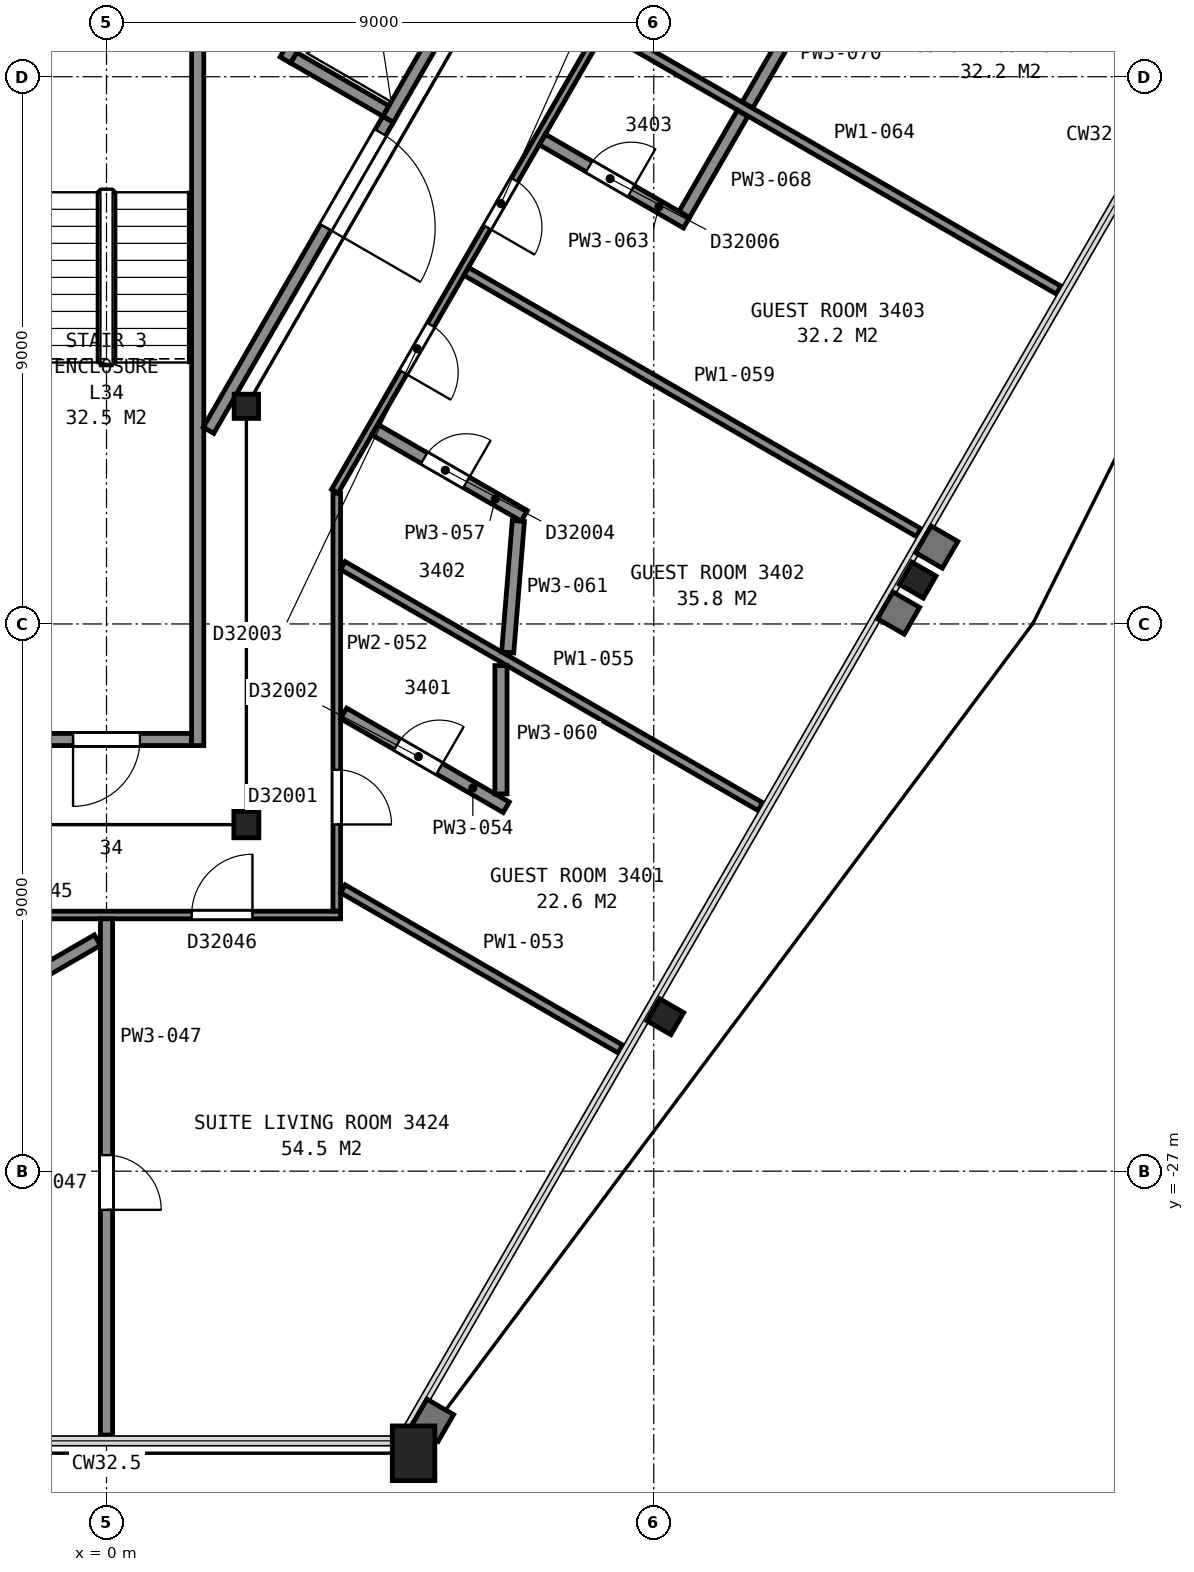
"""IFC4 building model, lengths in metres.
Left out: names, types, materials, properties, quantities, classifications, styles, units other than length and angle.
Written with IfcOpenShell. Run it as: python <this file> out.ifc"""

import sys

from ifc_helpers import new_model, si_unit, direction, frame, frame_2d, origin, origin_2d, place, context, subcontext, project, spatial, rectangle, hollow_rectangle, i_section, extrude, element, fill, save


model = new_model("IFC4")
c1 = context("Model", 3, precision=1e-05, world=origin(), true_north=direction((0.0, 1.0)))
c2 = subcontext(c1, "Body", "Model", "MODEL_VIEW")
j1 = project(units=[si_unit("LENGTHUNIT", "METRE"), si_unit("PLANEANGLEUNIT", "RADIAN")], contexts=[c1])
p1 = place(None, origin())
s1 = spatial("IfcSite", under=j1, at=p1, CompositionType="ELEMENT")
p2 = place(p1, origin())
s2 = spatial("IfcBuilding", under=s1, at=p2, CompositionType="ELEMENT")
p3 = place(p2, frame((0.0, 0.0, 139.6)))
s3 = spatial("IfcBuildingStorey", under=s2, at=p3, CompositionType="ELEMENT", Elevation=139.6)
p4 = place(p3, frame((5.05, -31.64, 0.0), z_axis=(0.0, 0.0, 1.0), x_axis=(-1.0, 0.0, 0.0)))
e1 = element("IfcColumn", 1, at=p4, inside=s3, PredefinedType="COLUMN", context=c2, shape_type="SweptSolid", body=[
    extrude(hollow_rectangle(XDim=0.7, YDim=0.9, WallThickness=0.065, at=origin_2d()), origin(), (0.0, 0.0, 1.0), 3.6),
])
for number, where, z_axis, x_axis in (
    (2, (9.19, -24.46, 0.0), (0.0, 0.0, 1.0), (-0.5, -0.866, 0.0)),
    (3, (13.34, -17.28, 0.0), (0.0, 0.0, 1.0), (-0.5, -0.866, 0.0)),
):
    element("IfcColumn", number, at=place(p3, frame(where, z_axis=z_axis, x_axis=x_axis)), inside=s3, PredefinedType="COLUMN", context=c2, shape_type="SweptSolid", body=[
        extrude(i_section(OverallWidth=0.419, OverallDepth=0.455, WebThickness=0.042, FlangeThickness=0.068, FilletRadius=0.015, at=origin_2d()), origin(), (0.0, 0.0, 1.0), 2.87),
    ])
p5 = place(p3, frame((2.3, -21.3, 0.0), z_axis=(0.0, 0.0, 1.0), x_axis=(-1.0, 0.0, 0.0)))
e4 = element("IfcColumn", 4, at=p5, inside=s3, PredefinedType="COLUMN", context=c2, shape_type="SweptSolid", body=[
    extrude(i_section(OverallWidth=0.411, OverallDepth=0.434, WebThickness=0.036, FlangeThickness=0.057, FilletRadius=0.015, at=origin_2d()), origin(), (0.0, 0.0, 1.0), 3.545),
])
p6 = place(p3, frame((2.3, -14.42, 0.0), z_axis=(0.0, 0.0, 1.0), x_axis=(1.0, 0.0, 0.0)))
e5 = element("IfcColumn", 5, at=p6, inside=s3, PredefinedType="COLUMN", context=c2, shape_type="SweptSolid", body=[
    extrude(i_section(OverallWidth=0.401, OverallDepth=0.399, WebThickness=0.025, FlangeThickness=0.04, FilletRadius=0.015, at=origin_2d()), origin(), (0.0, 0.0, 1.0), 3.55),
])
p7 = place(p3, frame((-1.4, -19.9, 0.0), z_axis=(0.0, 0.0, 1.0), x_axis=(1.0, 0.0, 0.0)))
e6 = element("IfcWall", 6, at=p7, inside=s3, PredefinedType="PARTITIONING", context=c2, shape_type="SweptSolid", body=[
    extrude(rectangle(XDim=2.8, YDim=0.2, at=frame_2d((1.4, 0.0))), origin(), (0.0, 0.0, 1.0), 3.35),
])
p8 = place(p7, frame((0.85, 0.0, 0.0)))
e7 = element("IfcOpeningElement", 7, at=p8, cuts=e6, PredefinedType="OPENING", context=c2, shape_type="SweptSolid", body=[
    extrude(rectangle(XDim=1.1, YDim=2.1, at=frame_2d((0.55, 1.05))), frame((0.0, 0.11, 0.0), z_axis=(0.0, -1.0, 0.0), x_axis=(1.0, 0.0, 0.0)), (0.0, 0.0, 1.0), 0.22),
])
p9 = place(p3, frame((1.5, -8.0, 0.0), z_axis=(0.0, 0.0, 1.0), x_axis=(0.0, -1.0, 0.0)))
e8 = element("IfcWall", 8, at=p9, inside=s3, PredefinedType="PARTITIONING", context=c2, shape_type="SweptSolid", body=[
    extrude(rectangle(XDim=12.0, YDim=0.2, at=frame_2d((6.0, 0.0))), origin(), (0.0, 0.0, 1.0), 3.35),
])
p10 = place(p3, frame((4.63, -9.7, 0.0), z_axis=(0.0, 0.0, 1.0), x_axis=(0.500062241894, 0.865989465428, 0.0)))
e9 = element("IfcWall", 9, at=p10, inside=s3, PredefinedType="PARTITIONING", context=c2, shape_type="SweptSolid", body=[
    extrude(rectangle(XDim=2.55, YDim=0.2, at=frame_2d((1.275, 0.0))), origin(), (0.0, 0.0, 1.0), 3.6),
])
p11 = place(p3, frame((2.942, -8.725, 0.0), z_axis=(0.0, 0.0, 1.0), x_axis=(0.500016218704, 0.866016039709, 0.0)))
e10 = element("IfcWall", 10, at=p11, inside=s3, PredefinedType="PARTITIONING", context=c2, shape_type="SweptSolid", body=[
    extrude(rectangle(XDim=2.35, YDim=0.2, at=frame_2d((1.175, 0.0))), origin(), (0.0, 0.0, 1.0), 3.6),
])
p12 = place(p11, frame((0.725, 0.0, 0.0)))
e11 = element("IfcOpeningElement", 11, at=p12, cuts=e10, PredefinedType="OPENING", context=c2, shape_type="SweptSolid", body=[
    extrude(rectangle(XDim=1.1, YDim=2.1, at=frame_2d((0.55, 1.05))), frame((0.0, 0.11, 0.0), z_axis=(0.0, -1.0, 0.0), x_axis=(1.0, 0.0, 0.0)), (0.0, 0.0, 1.0), 0.22),
])
p13 = place(p3, frame((4.594, -9.563, 0.0), z_axis=(0.0, 0.0, 1.0), x_axis=(-0.866036909293, 0.499980071345, 0.0)))
e12 = element("IfcWall", 12, at=p13, inside=s3, PredefinedType="PARTITIONING", context=c2, shape_type="SweptSolid", body=[
    extrude(rectangle(XDim=1.75, YDim=0.2, at=frame_2d((0.875, 0.0))), origin(), (0.0, 0.0, 1.0), 3.6),
])
p14 = place(p3, frame((1.677, -14.815, 0.0), z_axis=(0.0, 0.0, 1.0), x_axis=(0.49999445743, 0.866028603765, 0.0)))
e13 = element("IfcWall", 13, at=p14, inside=s3, PredefinedType="PARTITIONING", context=c2, shape_type="SweptSolid", body=[
    extrude(rectangle(XDim=5.905, YDim=0.2, at=frame_2d((2.952, 0.0))), origin(), (0.0, 0.0, 1.0), 3.35),
])
p15 = place(p14, frame((3.855, 0.0, 0.0)))
e14 = element("IfcOpeningElement", 14, at=p15, cuts=e13, PredefinedType="OPENING", context=c2, shape_type="SweptSolid", body=[
    extrude(rectangle(XDim=1.8, YDim=2.1, at=frame_2d((0.9, 1.05))), frame((0.0, 0.11, 0.0), z_axis=(0.0, -1.0, 0.0), x_axis=(1.0, 0.0, 0.0)), (0.0, 0.0, 1.0), 0.22),
])
p16 = place(p3, frame((-4.31, -25.602, 0.0), z_axis=(0.0, 0.0, 1.0), x_axis=(0.866045077667, 0.499965922287, 0.0)))
e15 = element("IfcWall", 15, at=p16, inside=s3, PredefinedType="PARTITIONING", context=c2, shape_type="SweptSolid", body=[
    extrude(rectangle(XDim=4.803, YDim=0.2, at=frame_2d((2.401, 0.0))), origin(), (0.0, 0.0, 1.0), 2.262),
])
p17 = place(p3, frame((3.85, -22.787, 0.0), z_axis=(0.0, 0.0, 1.0), x_axis=(-1.0, 0.0, 0.0)))
e16 = element("IfcWall", 16, at=p17, inside=s3, PredefinedType="PARTITIONING", context=c2, shape_type="SweptSolid", body=[
    extrude(rectangle(XDim=7.699, YDim=0.125, at=frame_2d((3.85, 0.0))), origin(), (0.0, 0.0, 1.0), 2.262),
])
p18 = place(p17, frame((1.449, 0.0, 0.0)))
e17 = element("IfcOpeningElement", 17, at=p18, cuts=e16, PredefinedType="OPENING", context=c2, shape_type="SweptSolid", body=[
    extrude(rectangle(XDim=1.0, YDim=2.1, at=frame_2d((0.5, 1.05))), frame((0.0, 0.073, 0.0), z_axis=(0.0, -1.0, 0.0), x_axis=(1.0, 0.0, 0.0)), (0.0, 0.0, 1.0), 0.145),
])
p19 = place(p3, frame((0.0, -31.34, 0.0), z_axis=(0.0, 0.0, 1.0), x_axis=(0.0, 1.0, 0.0)))
e18 = element("IfcWall", 18, at=p19, inside=s3, PredefinedType="PARTITIONING", context=c2, shape_type="SweptSolid", body=[
    extrude(rectangle(XDim=8.49, YDim=0.2, at=frame_2d((4.245, 0.0))), origin(), (0.0, 0.0, 1.0), 2.262),
])
p20 = place(p19, frame((3.704, 0.0, 0.0)))
e19 = element("IfcOpeningElement", 19, at=p20, cuts=e18, PredefinedType="OPENING", context=c2, shape_type="SweptSolid", body=[
    extrude(rectangle(XDim=0.9, YDim=2.1, at=frame_2d((0.45, 1.05))), frame((0.0, 0.11, 0.0), z_axis=(0.0, -1.0, 0.0), x_axis=(1.0, 0.0, 0.0)), (0.0, 0.0, 1.0), 0.22),
])
p21 = place(p3, frame((3.787, -15.847, 0.0), z_axis=(0.0, 0.0, 1.0), x_axis=(0.0, -1.0, 0.0)))
e20 = element("IfcWall", 20, at=p21, inside=s3, PredefinedType="PARTITIONING", context=c2, shape_type="SweptSolid", body=[
    extrude(rectangle(XDim=6.875, YDim=0.125, at=frame_2d((3.438, 0.0))), origin(), (0.0, 0.0, 1.0), 2.262),
])
p22 = place(p21, frame((4.551, 0.0, 0.0)))
e21 = element("IfcOpeningElement", 21, at=p22, cuts=e20, PredefinedType="OPENING", context=c2, shape_type="SweptSolid", body=[
    extrude(rectangle(XDim=0.9, YDim=2.1, at=frame_2d((0.45, 1.05))), frame((0.0, 0.073, 0.0), z_axis=(0.0, -1.0, 0.0), x_axis=(1.0, 0.0, 0.0)), (0.0, 0.0, 1.0), 0.145),
])
p23 = place(p3, frame((3.887, -22.356, 0.0), z_axis=(0.0, 0.0, 1.0), x_axis=(0.866039804031, -0.499975057213, 0.0)))
e22 = element("IfcWall", 22, at=p23, inside=s3, PredefinedType="PARTITIONING", context=c2, shape_type="SweptSolid", body=[
    extrude(rectangle(XDim=5.271, YDim=0.15, at=frame_2d((2.635, 0.0))), origin(), (0.0, 0.0, 1.0), 2.262),
])
p24 = place(p3, frame((3.899, -19.471, 0.0), z_axis=(0.0, 0.0, 1.0), x_axis=(0.866015731669, -0.500016752221, 0.0)))
e23 = element("IfcWall", 23, at=p24, inside=s3, PredefinedType="PARTITIONING", context=c2, shape_type="SweptSolid", body=[
    extrude(rectangle(XDim=3.088, YDim=0.2, at=frame_2d((1.544, 0.0))), origin(), (0.0, 0.0, 1.0), 2.262),
])
p25 = place(p24, frame((1.02, 0.0, 0.0)))
e24 = element("IfcOpeningElement", 24, at=p25, cuts=e23, PredefinedType="OPENING", context=c2, shape_type="SweptSolid", body=[
    extrude(rectangle(XDim=0.8, YDim=2.1, at=frame_2d((0.4, 1.05))), frame((0.0, 0.11, 0.0), z_axis=(0.0, -1.0, 0.0), x_axis=(1.0, 0.0, 0.0)), (0.0, 0.0, 1.0), 0.22),
])
p26 = place(p3, frame((3.887, -17.04, 0.0), z_axis=(0.0, 0.0, 1.0), x_axis=(0.866046118416, -0.499964119488, 0.0)))
e25 = element("IfcWall", 25, at=p26, inside=s3, PredefinedType="PARTITIONING", context=c2, shape_type="SweptSolid", body=[
    extrude(rectangle(XDim=7.929, YDim=0.15, at=frame_2d((3.964, 0.0))), origin(), (0.0, 0.0, 1.0), 2.262),
])
p27 = place(p3, frame((15.962, 5.326, 0.0), z_axis=(0.0, 0.0, 1.0), x_axis=(-0.499992829944, -0.866029543379, 0.0)))
e26 = element("IfcWall", 26, at=p27, inside=s3, PredefinedType="PARTITIONING", context=c2, shape_type="SweptSolid", body=[
    extrude(rectangle(XDim=24.413, YDim=0.125, at=frame_2d((12.207, 0.0))), origin(), (0.0, 0.0, 1.0), 2.262),
])
p28 = place(p27, frame((21.258, 0.0, 0.0)))
e27 = element("IfcOpeningElement", 27, at=p28, cuts=e26, PredefinedType="OPENING", context=c2, shape_type="SweptSolid", body=[
    extrude(rectangle(XDim=0.9, YDim=2.1, at=frame_2d((0.45, 1.05))), frame((0.0, 0.073, 0.0), z_axis=(0.0, -1.0, 0.0), x_axis=(1.0, 0.0, 0.0)), (0.0, 0.0, 1.0), 0.145),
])
p29 = place(p27, frame((18.502, 0.0, 0.0)))
e28 = element("IfcOpeningElement", 28, at=p29, cuts=e26, PredefinedType="OPENING", context=c2, shape_type="SweptSolid", body=[
    extrude(rectangle(XDim=0.9, YDim=2.1, at=frame_2d((0.45, 1.05))), frame((0.0, 0.073, 0.0), z_axis=(0.0, -1.0, 0.0), x_axis=(1.0, 0.0, 0.0)), (0.0, 0.0, 1.0), 0.145),
])
p30 = place(p27, frame((11.799, 0.0, 0.0)))
e29 = element("IfcOpeningElement", 29, at=p30, cuts=e26, PredefinedType="OPENING", context=c2, shape_type="SweptSolid", body=[
    extrude(rectangle(XDim=0.9, YDim=2.1, at=frame_2d((0.45, 1.05))), frame((0.0, 0.073, 0.0), z_axis=(0.0, -1.0, 0.0), x_axis=(1.0, 0.0, 0.0)), (0.0, 0.0, 1.0), 0.145),
])
p31 = place(p27, frame((9.043, 0.0, 0.0)))
e30 = element("IfcOpeningElement", 30, at=p31, cuts=e26, PredefinedType="OPENING", context=c2, shape_type="SweptSolid", body=[
    extrude(rectangle(XDim=0.9, YDim=2.1, at=frame_2d((0.45, 1.05))), frame((0.0, 0.073, 0.0), z_axis=(0.0, -1.0, 0.0), x_axis=(1.0, 0.0, 0.0)), (0.0, 0.0, 1.0), 0.145),
])
p32 = place(p27, frame((1.99, 0.0, 0.0)))
e31 = element("IfcOpeningElement", 31, at=p32, cuts=e26, PredefinedType="OPENING", context=c2, shape_type="SweptSolid", body=[
    extrude(rectangle(XDim=0.9, YDim=2.1, at=frame_2d((0.45, 1.05))), frame((0.0, 0.073, 0.0), z_axis=(0.0, -1.0, 0.0), x_axis=(1.0, 0.0, 0.0)), (0.0, 0.0, 1.0), 0.145),
])
p33 = place(p3, frame((6.871, -16.222, 0.0), z_axis=(0.0, 0.0, 1.0), x_axis=(-0.866048046904, 0.499960778915, 0.0)))
e32 = element("IfcWall", 32, at=p33, inside=s3, PredefinedType="PARTITIONING", context=c2, shape_type="SweptSolid", body=[
    extrude(rectangle(XDim=2.838, YDim=0.2, at=frame_2d((1.419, 0.0))), origin(), (0.0, 0.0, 1.0), 2.262),
])
p34 = place(p33, frame((1.1, 0.0, 0.0)))
e33 = element("IfcOpeningElement", 33, at=p34, cuts=e32, PredefinedType="OPENING", context=c2, shape_type="SweptSolid", body=[
    extrude(rectangle(XDim=0.8, YDim=2.1, at=frame_2d((0.4, 1.05))), frame((0.0, 0.11, 0.0), z_axis=(0.0, -1.0, 0.0), x_axis=(1.0, 0.0, 0.0)), (0.0, 0.0, 1.0), 0.22),
])
p35 = place(p3, frame((5.916, -12.201, 0.0), z_axis=(0.0, 0.0, 1.0), x_axis=(0.865995804368, -0.50005126419, 0.0)))
e34 = element("IfcWall", 34, at=p35, inside=s3, PredefinedType="PARTITIONING", context=c2, shape_type="SweptSolid", body=[
    extrude(rectangle(XDim=8.591, YDim=0.15, at=frame_2d((4.295, 0.0))), origin(), (0.0, 0.0, 1.0), 2.262),
])
p36 = place(p3, frame((6.487, -20.795, 0.0), z_axis=(0.0, 0.0, 1.0), x_axis=(0.0, 1.0, 0.0)))
e35 = element("IfcWall", 35, at=p36, inside=s3, PredefinedType="PARTITIONING", context=c2, shape_type="SweptSolid", body=[
    extrude(rectangle(XDim=2.111, YDim=0.2, at=frame_2d((1.055, 0.0))), origin(), (0.0, 0.0, 1.0), 2.262),
])
p37 = place(p3, frame((6.598, -18.468, 0.0), z_axis=(0.0, 0.0, 1.0), x_axis=(0.080948878916, 0.996718254575, 0.0)))
e36 = element("IfcWall", 36, at=p37, inside=s3, PredefinedType="PARTITIONING", context=c2, shape_type="SweptSolid", body=[
    extrude(rectangle(XDim=2.168, YDim=0.2, at=frame_2d((1.084, 0.0))), origin(), (0.0, 0.0, 1.0), 2.262),
])
p38 = place(p3, frame((7.168, -10.032, 0.0), z_axis=(0.0, 0.0, 1.0), x_axis=(0.86596722502, -0.50010075504, 0.0)))
e37 = element("IfcWall", 37, at=p38, inside=s3, PredefinedType="PARTITIONING", context=c2, shape_type="SweptSolid", body=[
    extrude(rectangle(XDim=2.737, YDim=0.2, at=frame_2d((1.369, 0.0))), origin(), (0.0, 0.0, 1.0), 2.262),
])
p39 = place(p38, frame((0.887, 0.0, 0.0)))
e38 = element("IfcOpeningElement", 38, at=p39, cuts=e37, PredefinedType="OPENING", context=c2, shape_type="SweptSolid", body=[
    extrude(rectangle(XDim=0.8, YDim=2.1, at=frame_2d((0.4, 1.05))), frame((0.0, 0.11, 0.0), z_axis=(0.0, -1.0, 0.0), x_axis=(1.0, 0.0, 0.0)), (0.0, 0.0, 1.0), 0.22),
])
p40 = place(p3, frame((8.218, -8.213, 0.0), z_axis=(0.0, 0.0, 1.0), x_axis=(0.865997709989, -0.500047963993, 0.0)))
e39 = element("IfcWall", 39, at=p40, inside=s3, PredefinedType="PARTITIONING", context=c2, shape_type="SweptSolid", body=[
    extrude(rectangle(XDim=8.592, YDim=0.15, at=frame_2d((4.296, 0.0))), origin(), (0.0, 0.0, 1.0), 2.262),
])
p41 = place(p3, frame((9.502, -11.264, 0.0), z_axis=(0.0, 0.0, 1.0), x_axis=(0.499887618105, 0.86609027778, 0.0)))
e40 = element("IfcWall", 40, at=p41, inside=s3, PredefinedType="PARTITIONING", context=c2, shape_type="SweptSolid", body=[
    extrude(rectangle(XDim=1.919, YDim=0.2, at=frame_2d((0.96, 0.0))), origin(), (0.0, 0.0, 1.0), 2.262),
])
p42 = place(p3, frame((10.542, -9.463, 0.0), z_axis=(0.0, 0.0, 1.0), x_axis=(0.500214044309, 0.865901789971, 0.0)))
e41 = element("IfcWall", 41, at=p42, inside=s3, PredefinedType="PARTITIONING", context=c2, shape_type="SweptSolid", body=[
    extrude(rectangle(XDim=1.92, YDim=0.2, at=frame_2d((0.96, 0.0))), origin(), (0.0, 0.0, 1.0), 2.262),
])
p43 = place(p8, origin())
e42 = element("IfcDoor", 42, at=p43, inside=s3, OperationType="SINGLE_SWING_LEFT", PredefinedType="DOOR", context=c2, shape_type="SweptSolid", body=[
    extrude(rectangle(XDim=1.1, YDim=2.1, at=frame_2d((0.55, 1.05))), frame((0.0, 0.025, 0.0), z_axis=(0.0, -1.0, 0.0), x_axis=(1.0, 0.0, 0.0)), (0.0, 0.0, 1.0), 0.05),
])
fill(e7, e42)
p44 = place(p15, origin())
e43 = element("IfcDoor", 43, at=p44, inside=s3, OperationType="DOUBLE_DOOR_SINGLE_SWING", PredefinedType="DOOR", context=c2, shape_type="SweptSolid", body=[
    extrude(rectangle(XDim=1.8, YDim=2.1, at=frame_2d((0.9, 1.05))), frame((0.0, 0.025, 0.0), z_axis=(0.0, -1.0, 0.0), x_axis=(1.0, 0.0, 0.0)), (0.0, 0.0, 1.0), 0.05),
])
fill(e14, e43)
p45 = place(p18, origin())
e44 = element("IfcDoor", 44, at=p45, inside=s3, OperationType="SINGLE_SWING_LEFT", PredefinedType="DOOR", context=c2, shape_type="SweptSolid", body=[
    extrude(rectangle(XDim=1.0, YDim=2.1, at=frame_2d((0.5, 1.05))), frame((0.0, 0.025, 0.0), z_axis=(0.0, -1.0, 0.0), x_axis=(1.0, 0.0, 0.0)), (0.0, 0.0, 1.0), 0.05),
])
fill(e17, e44)
p46 = place(p20, origin())
e45 = element("IfcDoor", 45, at=p46, inside=s3, OperationType="SINGLE_SWING_LEFT", PredefinedType="DOOR", context=c2, shape_type="SweptSolid", body=[
    extrude(rectangle(XDim=0.9, YDim=2.1, at=frame_2d((0.45, 1.05))), frame((0.0, 0.025, 0.0), z_axis=(0.0, -1.0, 0.0), x_axis=(1.0, 0.0, 0.0)), (0.0, 0.0, 1.0), 0.05),
])
fill(e19, e45)
p47 = place(p22, origin())
e46 = element("IfcDoor", 46, at=p47, inside=s3, OperationType="SINGLE_SWING_RIGHT", PredefinedType="DOOR", context=c2, shape_type="SweptSolid", body=[
    extrude(rectangle(XDim=0.9, YDim=2.1, at=frame_2d((0.45, 1.05))), frame((0.0, 0.025, 0.0), z_axis=(0.0, -1.0, 0.0), x_axis=(1.0, 0.0, 0.0)), (0.0, 0.0, 1.0), 0.05),
])
fill(e21, e46)
p48 = place(p25, origin())
e47 = element("IfcDoor", 47, at=p48, inside=s3, OperationType="SINGLE_SWING_RIGHT", PredefinedType="DOOR", context=c2, shape_type="SweptSolid", body=[
    extrude(rectangle(XDim=0.8, YDim=2.1, at=frame_2d((0.4, 1.05))), frame((0.0, 0.025, 0.0), z_axis=(0.0, -1.0, 0.0), x_axis=(1.0, 0.0, 0.0)), (0.0, 0.0, 1.0), 0.05),
])
fill(e24, e47)
p49 = place(p28, origin())
e48 = element("IfcDoor", 48, at=p49, inside=s3, OperationType="SINGLE_SWING_RIGHT", PredefinedType="DOOR", context=c2, shape_type="SweptSolid", body=[
    extrude(rectangle(XDim=0.9, YDim=2.1, at=frame_2d((0.45, 1.05))), frame((0.0, 0.025, 0.0), z_axis=(0.0, -1.0, 0.0), x_axis=(1.0, 0.0, 0.0)), (0.0, 0.0, 1.0), 0.05),
])
fill(e27, e48)
p50 = place(p29, origin())
e49 = element("IfcDoor", 49, at=p50, inside=s3, OperationType="SINGLE_SWING_RIGHT", PredefinedType="DOOR", context=c2, shape_type="SweptSolid", body=[
    extrude(rectangle(XDim=0.9, YDim=2.1, at=frame_2d((0.45, 1.05))), frame((0.0, 0.025, 0.0), z_axis=(0.0, -1.0, 0.0), x_axis=(1.0, 0.0, 0.0)), (0.0, 0.0, 1.0), 0.05),
])
fill(e28, e49)
p51 = place(p34, origin())
e50 = element("IfcDoor", 50, at=p51, inside=s3, OperationType="SINGLE_SWING_LEFT", PredefinedType="DOOR", context=c2, shape_type="SweptSolid", body=[
    extrude(rectangle(XDim=0.8, YDim=2.1, at=frame_2d((0.4, 1.05))), frame((0.0, 0.025, 0.0), z_axis=(0.0, -1.0, 0.0), x_axis=(1.0, 0.0, 0.0)), (0.0, 0.0, 1.0), 0.05),
])
fill(e33, e50)
p52 = place(p39, origin())
e51 = element("IfcDoor", 51, at=p52, inside=s3, OperationType="SINGLE_SWING_RIGHT", PredefinedType="DOOR", context=c2, shape_type="SweptSolid", body=[
    extrude(rectangle(XDim=0.8, YDim=2.1, at=frame_2d((0.4, 1.05))), frame((0.0, 0.025, 0.0), z_axis=(0.0, -1.0, 0.0), x_axis=(1.0, 0.0, 0.0)), (0.0, 0.0, 1.0), 0.05),
])
fill(e38, e51)
save(model, sys.argv[1])
